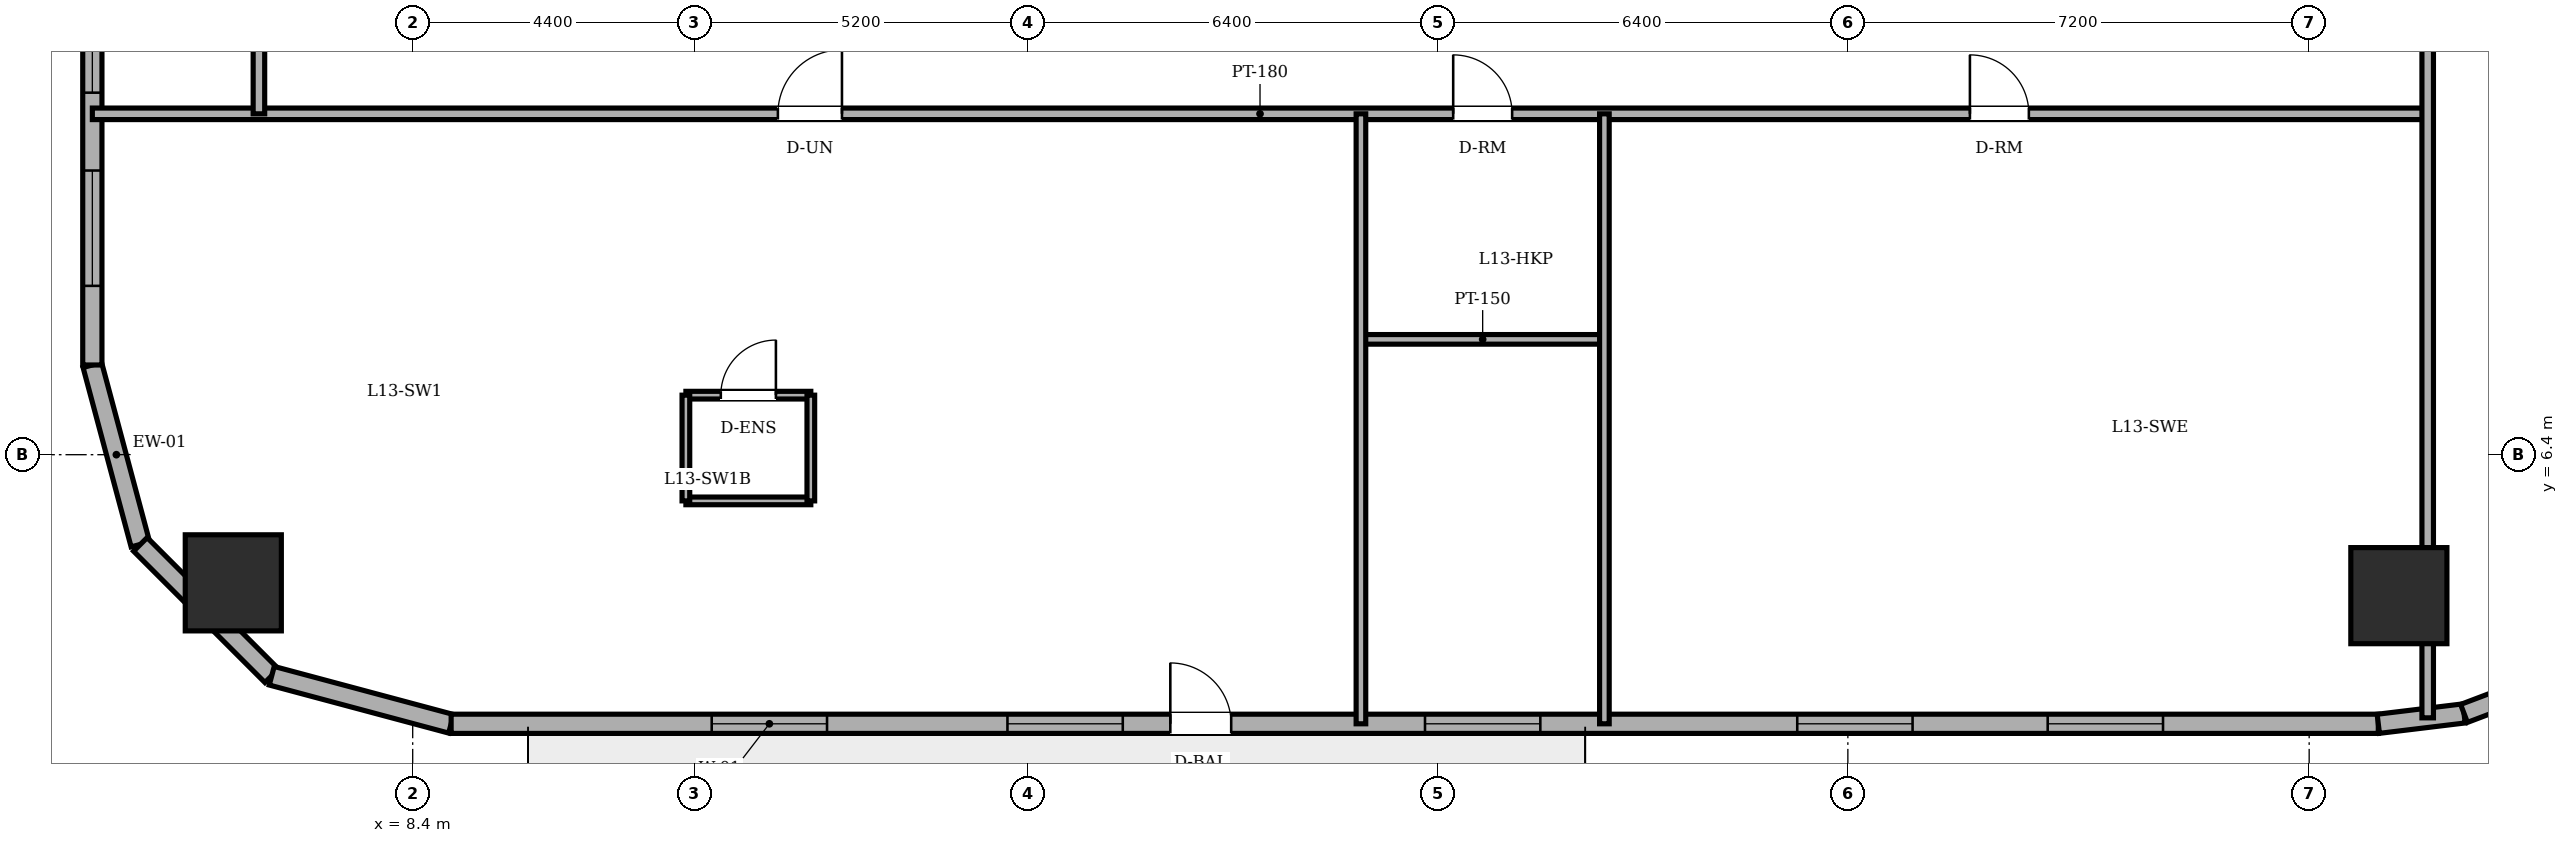
"""IFC4 building model, lengths in metres.
Left out: names, types, materials, properties, quantities, classifications, styles, units other than length and angle.
Written with IfcOpenShell. Run it as: python <this file> out.ifc"""

import sys

from ifc_helpers import new_model, si_unit, direction, frame, frame_2d, origin, origin_2d, place, context, subcontext, project, spatial, rectangle, circle, extrude, element, fill, save


model = new_model("IFC4")
c1 = context("Model", 3, precision=1e-05, world=origin(), true_north=direction((0.0, 1.0)))
c2 = subcontext(c1, "Body", "Model", "MODEL_VIEW")
j1 = project(units=[si_unit("LENGTHUNIT", "METRE"), si_unit("PLANEANGLEUNIT", "RADIAN")], contexts=[c1])
p1 = place(None, origin())
s1 = spatial("IfcSite", under=j1, at=p1, CompositionType="ELEMENT")
p2 = place(p1, origin())
s2 = spatial("IfcBuilding", under=s1, at=p2, CompositionType="ELEMENT")
p3 = place(p2, frame((0.0, 0.0, 50.4)))
s3 = spatial("IfcBuildingStorey", under=s2, at=p3, CompositionType="ELEMENT", Elevation=50.4)
for number, where, z_axis, x_axis in (
    (1, (5.6, 4.4, 0.0), (0.0, 0.0, 1.0), (1.0, 0.0, 0.0)),
    (2, (39.4, 4.2, 0.0), (0.0, 0.0, 1.0), (1.0, 0.0, 0.0)),
):
    element("IfcColumn", number, at=place(p3, frame(where, z_axis=z_axis, x_axis=x_axis)), inside=s3, PredefinedType="COLUMN", context=c2, shape_type="SweptSolid", body=[
        extrude(circle(Radius=0.75, at=origin_2d()), origin(), (0.0, 0.0, 1.0), 3.6),
    ])
p4 = place(p3, frame((3.4, 7.8, 0.0), z_axis=(0.0, 0.0, 1.0), x_axis=(0.258731875344, -0.96594917914, 0.0)))
e3 = element("IfcWall", 3, at=p4, inside=s3, PredefinedType="SOLIDWALL", context=c2, shape_type="SweptSolid", body=[
    extrude(rectangle(XDim=2.899, YDim=0.3, at=frame_2d((1.449, 0.0))), origin(), (0.0, 0.0, 1.0), 3.4),
])
p5 = place(p3, frame((4.15, 5.0, 0.0), z_axis=(0.0, 0.0, 1.0), x_axis=(0.707106781187, -0.707106781187, 0.0)))
e4 = element("IfcWall", 4, at=p5, inside=s3, PredefinedType="SOLIDWALL", context=c2, shape_type="SweptSolid", body=[
    extrude(rectangle(XDim=2.899, YDim=0.3, at=frame_2d((1.45, 0.0))), origin(), (0.0, 0.0, 1.0), 3.4),
])
p6 = place(p3, frame((6.2, 2.95, 0.0), z_axis=(0.0, 0.0, 1.0), x_axis=(0.96594917914, -0.258731875344, 0.0)))
e5 = element("IfcWall", 5, at=p6, inside=s3, PredefinedType="SOLIDWALL", context=c2, shape_type="SweptSolid", body=[
    extrude(rectangle(XDim=2.899, YDim=0.3, at=frame_2d((1.449, 0.0))), origin(), (0.0, 0.0, 1.0), 3.4),
])
p7 = place(p3, frame((9.0, 2.2, 0.0), z_axis=(0.0, 0.0, 1.0), x_axis=(1.0, 0.0, 0.0)))
e6 = element("IfcWall", 6, at=p7, inside=s3, PredefinedType="SOLIDWALL", context=c2, shape_type="SweptSolid", body=[
    extrude(rectangle(XDim=30.079, YDim=0.3, at=frame_2d((15.04, 0.0))), origin(), (0.0, 0.0, 1.0), 3.4),
])
p8 = place(p7, frame((11.225, 0.0, 0.0)))
e7 = element("IfcOpeningElement", 7, at=p8, cuts=e6, PredefinedType="OPENING", context=c2, shape_type="SweptSolid", body=[
    extrude(rectangle(XDim=0.95, YDim=2.2, at=frame_2d((0.475, 1.1))), frame((0.0, 0.16, 0.0), z_axis=(0.0, -1.0, 0.0), x_axis=(1.0, 0.0, 0.0)), (0.0, 0.0, 1.0), 0.32),
])
p9 = place(p7, frame((4.067, 0.0, 0.85)))
e8 = element("IfcOpeningElement", 8, at=p9, cuts=e6, PredefinedType="OPENING", context=c2, shape_type="SweptSolid", body=[
    extrude(rectangle(XDim=1.8, YDim=1.55, at=frame_2d((0.9, 0.775))), frame((0.0, 0.16, 0.0), z_axis=(0.0, -1.0, 0.0), x_axis=(1.0, 0.0, 0.0)), (0.0, 0.0, 1.0), 0.32),
])
p10 = place(p7, frame((8.683, 0.0, 0.85)))
e9 = element("IfcOpeningElement", 9, at=p10, cuts=e6, PredefinedType="OPENING", context=c2, shape_type="SweptSolid", body=[
    extrude(rectangle(XDim=1.8, YDim=1.55, at=frame_2d((0.9, 0.775))), frame((0.0, 0.16, 0.0), z_axis=(0.0, -1.0, 0.0), x_axis=(1.0, 0.0, 0.0)), (0.0, 0.0, 1.0), 0.32),
])
p11 = place(p7, frame((15.2, 0.0, 0.85)))
e10 = element("IfcOpeningElement", 10, at=p11, cuts=e6, PredefinedType="OPENING", context=c2, shape_type="SweptSolid", body=[
    extrude(rectangle(XDim=1.8, YDim=1.55, at=frame_2d((0.9, 0.775))), frame((0.0, 0.16, 0.0), z_axis=(0.0, -1.0, 0.0), x_axis=(1.0, 0.0, 0.0)), (0.0, 0.0, 1.0), 0.32),
])
p12 = place(p7, frame((21.01, 0.0, 0.85)))
e11 = element("IfcOpeningElement", 11, at=p12, cuts=e6, PredefinedType="OPENING", context=c2, shape_type="SweptSolid", body=[
    extrude(rectangle(XDim=1.8, YDim=1.55, at=frame_2d((0.9, 0.775))), frame((0.0, 0.16, 0.0), z_axis=(0.0, -1.0, 0.0), x_axis=(1.0, 0.0, 0.0)), (0.0, 0.0, 1.0), 0.32),
])
p13 = place(p7, frame((24.919, 0.0, 0.85)))
e12 = element("IfcOpeningElement", 12, at=p13, cuts=e6, PredefinedType="OPENING", context=c2, shape_type="SweptSolid", body=[
    extrude(rectangle(XDim=1.8, YDim=1.55, at=frame_2d((0.9, 0.775))), frame((0.0, 0.16, 0.0), z_axis=(0.0, -1.0, 0.0), x_axis=(1.0, 0.0, 0.0)), (0.0, 0.0, 1.0), 0.32),
])
p14 = place(p3, frame((39.079, 2.2, 0.0), z_axis=(0.0, 0.0, 1.0), x_axis=(0.992739027259, 0.120288086515, 0.0)))
e13 = element("IfcWall", 13, at=p14, inside=s3, PredefinedType="SOLIDWALL", context=c2, shape_type="SweptSolid", body=[
    extrude(rectangle(XDim=1.348, YDim=0.3, at=frame_2d((0.674, 0.0))), origin(), (0.0, 0.0, 1.0), 3.4),
])
p15 = place(p3, frame((40.417, 2.362, 0.0), z_axis=(0.0, 0.0, 1.0), x_axis=(0.935156721165, 0.354234254216, 0.0)))
e14 = element("IfcWall", 14, at=p15, inside=s3, PredefinedType="SOLIDWALL", context=c2, shape_type="SweptSolid", body=[
    extrude(rectangle(XDim=1.349, YDim=0.3, at=frame_2d((0.675, 0.0))), origin(), (0.0, 0.0, 1.0), 3.4),
])
p16 = place(p3, frame((3.4, 40.2, 0.0), z_axis=(0.0, 0.0, 1.0), x_axis=(0.0, -1.0, 0.0)))
e15 = element("IfcWall", 15, at=p16, inside=s3, PredefinedType="SOLIDWALL", context=c2, shape_type="SweptSolid", body=[
    extrude(rectangle(XDim=32.4, YDim=0.3, at=frame_2d((16.2, 0.0))), origin(), (0.0, 0.0, 1.0), 3.4),
])
p17 = place(p16, frame((1.235, 0.0, 0.85)))
e16 = element("IfcOpeningElement", 16, at=p17, cuts=e15, PredefinedType="OPENING", context=c2, shape_type="SweptSolid", body=[
    extrude(rectangle(XDim=1.8, YDim=1.55, at=frame_2d((0.9, 0.775))), frame((0.0, 0.16, 0.0), z_axis=(0.0, -1.0, 0.0), x_axis=(1.0, 0.0, 0.0)), (0.0, 0.0, 1.0), 0.32),
])
p18 = place(p16, frame((4.25, 0.0, 0.85)))
e17 = element("IfcOpeningElement", 17, at=p18, cuts=e15, PredefinedType="OPENING", context=c2, shape_type="SweptSolid", body=[
    extrude(rectangle(XDim=1.8, YDim=1.55, at=frame_2d((0.9, 0.775))), frame((0.0, 0.16, 0.0), z_axis=(0.0, -1.0, 0.0), x_axis=(1.0, 0.0, 0.0)), (0.0, 0.0, 1.0), 0.32),
])
p19 = place(p16, frame((9.253, 0.0, 0.85)))
e18 = element("IfcOpeningElement", 18, at=p19, cuts=e15, PredefinedType="OPENING", context=c2, shape_type="SweptSolid", body=[
    extrude(rectangle(XDim=1.8, YDim=1.55, at=frame_2d((0.9, 0.775))), frame((0.0, 0.16, 0.0), z_axis=(0.0, -1.0, 0.0), x_axis=(1.0, 0.0, 0.0)), (0.0, 0.0, 1.0), 0.32),
])
p20 = place(p16, frame((13.027, 0.0, 0.85)))
e19 = element("IfcOpeningElement", 19, at=p20, cuts=e15, PredefinedType="OPENING", context=c2, shape_type="SweptSolid", body=[
    extrude(rectangle(XDim=1.8, YDim=1.55, at=frame_2d((0.9, 0.775))), frame((0.0, 0.16, 0.0), z_axis=(0.0, -1.0, 0.0), x_axis=(1.0, 0.0, 0.0)), (0.0, 0.0, 1.0), 0.32),
])
p21 = place(p16, frame((19.573, 0.0, 0.85)))
e20 = element("IfcOpeningElement", 20, at=p21, cuts=e15, PredefinedType="OPENING", context=c2, shape_type="SweptSolid", body=[
    extrude(rectangle(XDim=1.8, YDim=1.55, at=frame_2d((0.9, 0.775))), frame((0.0, 0.16, 0.0), z_axis=(0.0, -1.0, 0.0), x_axis=(1.0, 0.0, 0.0)), (0.0, 0.0, 1.0), 0.32),
])
p22 = place(p16, frame((22.347, 0.0, 0.85)))
e21 = element("IfcOpeningElement", 21, at=p22, cuts=e15, PredefinedType="OPENING", context=c2, shape_type="SweptSolid", body=[
    extrude(rectangle(XDim=1.8, YDim=1.55, at=frame_2d((0.9, 0.775))), frame((0.0, 0.16, 0.0), z_axis=(0.0, -1.0, 0.0), x_axis=(1.0, 0.0, 0.0)), (0.0, 0.0, 1.0), 0.32),
])
p23 = place(p16, frame((26.35, 0.0, 0.85)))
e22 = element("IfcOpeningElement", 22, at=p23, cuts=e15, PredefinedType="OPENING", context=c2, shape_type="SweptSolid", body=[
    extrude(rectangle(XDim=1.8, YDim=1.55, at=frame_2d((0.9, 0.775))), frame((0.0, 0.16, 0.0), z_axis=(0.0, -1.0, 0.0), x_axis=(1.0, 0.0, 0.0)), (0.0, 0.0, 1.0), 0.32),
])
p24 = place(p16, frame((29.365, 0.0, 0.85)))
e23 = element("IfcOpeningElement", 23, at=p24, cuts=e15, PredefinedType="OPENING", context=c2, shape_type="SweptSolid", body=[
    extrude(rectangle(XDim=1.8, YDim=1.55, at=frame_2d((0.9, 0.775))), frame((0.0, 0.16, 0.0), z_axis=(0.0, -1.0, 0.0), x_axis=(1.0, 0.0, 0.0)), (0.0, 0.0, 1.0), 0.32),
])
p25 = place(p3, frame((12.664, 7.329, 0.0), z_axis=(0.0, 0.0, 1.0), x_axis=(1.0, 0.0, 0.0)))
e24 = element("IfcWall", 24, at=p25, inside=s3, PredefinedType="PARTITIONING", context=c2, shape_type="SweptSolid", body=[
    extrude(rectangle(XDim=1.95, YDim=0.12, at=frame_2d((0.975, 0.0))), origin(), (0.0, 0.0, 1.0), 3.4),
])
p26 = place(p25, frame((0.545, 0.0, 0.0)))
e25 = element("IfcOpeningElement", 25, at=p26, cuts=e24, PredefinedType="OPENING", context=c2, shape_type="SweptSolid", body=[
    extrude(rectangle(XDim=0.86, YDim=2.1, at=frame_2d((0.43, 1.05))), frame((0.0, 0.07, 0.0), z_axis=(0.0, -1.0, 0.0), x_axis=(1.0, 0.0, 0.0)), (0.0, 0.0, 1.0), 0.14),
])
p27 = place(p3, frame((14.614, 5.679, 0.0), z_axis=(0.0, 0.0, 1.0), x_axis=(-1.0, 0.0, 0.0)))
e26 = element("IfcWall", 26, at=p27, inside=s3, PredefinedType="PARTITIONING", context=c2, shape_type="SweptSolid", body=[
    extrude(rectangle(XDim=1.95, YDim=0.12, at=frame_2d((0.975, 0.0))), origin(), (0.0, 0.0, 1.0), 3.4),
])
for number, where, z_axis, x_axis in (
    (27, (12.664, 7.329, 0.0), (0.0, 0.0, 1.0), (0.0, -1.0, 0.0)),
    (28, (14.614, 5.679, 0.0), (0.0, 0.0, 1.0), (0.0, 1.0, 0.0)),
):
    element("IfcWall", number, at=place(p3, frame(where, z_axis=z_axis, x_axis=x_axis)), inside=s3, PredefinedType="PARTITIONING", context=c2, shape_type="SweptSolid", body=[
        extrude(rectangle(XDim=1.65, YDim=0.12, at=frame_2d((0.825, 0.0))), origin(), (0.0, 0.0, 1.0), 3.4),
    ])
p28 = place(p3, frame((23.2, 8.2, 0.0), z_axis=(0.0, 0.0, 1.0), x_axis=(1.0, 0.0, 0.0)))
e29 = element("IfcWall", 29, at=p28, inside=s3, PredefinedType="PARTITIONING", context=c2, shape_type="SweptSolid", body=[
    extrude(rectangle(XDim=3.8, YDim=0.15, at=frame_2d((1.9, 0.0))), origin(), (0.0, 0.0, 1.0), 3.4),
])
p29 = place(p3, frame((3.4, 11.72, 0.0), z_axis=(0.0, 0.0, 1.0), x_axis=(1.0, 0.0, 0.0)))
e30 = element("IfcWall", 30, at=p29, inside=s3, PredefinedType="PARTITIONING", context=c2, shape_type="SweptSolid", body=[
    extrude(rectangle(XDim=36.45, YDim=0.18, at=frame_2d((18.225, 0.0))), origin(), (0.0, 0.0, 1.0), 3.4),
])
p30 = place(p29, frame((21.24, 0.0, 0.0)))
e31 = element("IfcOpeningElement", 31, at=p30, cuts=e30, PredefinedType="OPENING", context=c2, shape_type="SweptSolid", body=[
    extrude(rectangle(XDim=0.92, YDim=2.1, at=frame_2d((0.46, 1.05))), frame((0.0, 0.1, 0.0), z_axis=(0.0, -1.0, 0.0), x_axis=(1.0, 0.0, 0.0)), (0.0, 0.0, 1.0), 0.2),
])
p31 = place(p29, frame((10.7, 0.0, 0.0)))
e32 = element("IfcOpeningElement", 32, at=p31, cuts=e30, PredefinedType="OPENING", context=c2, shape_type="SweptSolid", body=[
    extrude(rectangle(XDim=1.0, YDim=2.15, at=frame_2d((0.5, 1.075))), frame((0.0, 0.1, 0.0), z_axis=(0.0, -1.0, 0.0), x_axis=(1.0, 0.0, 0.0)), (0.0, 0.0, 1.0), 0.2),
])
p32 = place(p29, frame((29.305, 0.0, 0.0)))
e33 = element("IfcOpeningElement", 33, at=p32, cuts=e30, PredefinedType="OPENING", context=c2, shape_type="SweptSolid", body=[
    extrude(rectangle(XDim=0.92, YDim=2.1, at=frame_2d((0.46, 1.05))), frame((0.0, 0.1, 0.0), z_axis=(0.0, -1.0, 0.0), x_axis=(1.0, 0.0, 0.0)), (0.0, 0.0, 1.0), 0.2),
])
p33 = place(p3, frame((6.0, 11.72, 0.0), z_axis=(0.0, 0.0, 1.0), x_axis=(0.0, 1.0, 0.0)))
e34 = element("IfcWall", 34, at=p33, inside=s3, PredefinedType="PARTITIONING", context=c2, shape_type="SweptSolid", body=[
    extrude(rectangle(XDim=2.46, YDim=0.18, at=frame_2d((1.23, 0.0))), origin(), (0.0, 0.0, 1.0), 3.4),
])
for number, where, z_axis, x_axis in (
    (35, (23.2, 2.2, 0.0), (0.0, 0.0, 1.0), (0.0, 1.0, 0.0)),
    (36, (27.0, 2.2, 0.0), (0.0, 0.0, 1.0), (0.0, 1.0, 0.0)),
):
    element("IfcWall", number, at=place(p3, frame(where, z_axis=z_axis, x_axis=x_axis)), inside=s3, PredefinedType="PARTITIONING", context=c2, shape_type="SweptSolid", body=[
        extrude(rectangle(XDim=9.52, YDim=0.15, at=frame_2d((4.76, 0.0))), origin(), (0.0, 0.0, 1.0), 3.4),
    ])
p34 = place(p3, frame((39.85, 2.293, 0.0), z_axis=(0.0, 0.0, 1.0), x_axis=(0.0, 1.0, 0.0)))
e37 = element("IfcWall", 37, at=p34, inside=s3, PredefinedType="PARTITIONING", context=c2, shape_type="SweptSolid", body=[
    extrude(rectangle(XDim=20.527, YDim=0.18, at=frame_2d((10.264, 0.0))), origin(), (0.0, 0.0, 1.0), 2.782),
])
p35 = place(p34, frame((14.257, 0.0, 0.0)))
e38 = element("IfcOpeningElement", 38, at=p35, cuts=e37, PredefinedType="OPENING", context=c2, shape_type="SweptSolid", body=[
    extrude(rectangle(XDim=0.92, YDim=2.1, at=frame_2d((0.46, 1.05))), frame((0.0, 0.1, 0.0), z_axis=(0.0, -1.0, 0.0), x_axis=(1.0, 0.0, 0.0)), (0.0, 0.0, 1.0), 0.2),
])
p36 = place(p8, origin())
e39 = element("IfcDoor", 39, at=p36, inside=s3, OperationType="SINGLE_SWING_LEFT", PredefinedType="DOOR", context=c2, shape_type="SweptSolid", body=[
    extrude(rectangle(XDim=0.95, YDim=2.2, at=frame_2d((0.475, 1.1))), frame((0.0, 0.025, 0.0), z_axis=(0.0, -1.0, 0.0), x_axis=(1.0, 0.0, 0.0)), (0.0, 0.0, 1.0), 0.05),
])
fill(e7, e39)
p37 = place(p9, origin())
e40 = element("IfcWindow", 40, at=p37, inside=s3, PartitioningType="DOUBLE_PANEL_VERTICAL", PredefinedType="WINDOW", context=c2, shape_type="SweptSolid", body=[
    extrude(rectangle(XDim=1.8, YDim=1.55, at=frame_2d((0.9, 0.775))), frame((0.0, 0.03, 0.0), z_axis=(0.0, -1.0, 0.0), x_axis=(1.0, 0.0, 0.0)), (0.0, 0.0, 1.0), 0.06),
])
fill(e8, e40)
p38 = place(p10, origin())
e41 = element("IfcWindow", 41, at=p38, inside=s3, PartitioningType="DOUBLE_PANEL_VERTICAL", PredefinedType="WINDOW", context=c2, shape_type="SweptSolid", body=[
    extrude(rectangle(XDim=1.8, YDim=1.55, at=frame_2d((0.9, 0.775))), frame((0.0, 0.03, 0.0), z_axis=(0.0, -1.0, 0.0), x_axis=(1.0, 0.0, 0.0)), (0.0, 0.0, 1.0), 0.06),
])
fill(e9, e41)
p39 = place(p11, origin())
e42 = element("IfcWindow", 42, at=p39, inside=s3, PartitioningType="DOUBLE_PANEL_VERTICAL", PredefinedType="WINDOW", context=c2, shape_type="SweptSolid", body=[
    extrude(rectangle(XDim=1.8, YDim=1.55, at=frame_2d((0.9, 0.775))), frame((0.0, 0.03, 0.0), z_axis=(0.0, -1.0, 0.0), x_axis=(1.0, 0.0, 0.0)), (0.0, 0.0, 1.0), 0.06),
])
fill(e10, e42)
p40 = place(p12, origin())
e43 = element("IfcWindow", 43, at=p40, inside=s3, PartitioningType="DOUBLE_PANEL_VERTICAL", PredefinedType="WINDOW", context=c2, shape_type="SweptSolid", body=[
    extrude(rectangle(XDim=1.8, YDim=1.55, at=frame_2d((0.9, 0.775))), frame((0.0, 0.03, 0.0), z_axis=(0.0, -1.0, 0.0), x_axis=(1.0, 0.0, 0.0)), (0.0, 0.0, 1.0), 0.06),
])
fill(e11, e43)
p41 = place(p13, origin())
e44 = element("IfcWindow", 44, at=p41, inside=s3, PartitioningType="DOUBLE_PANEL_VERTICAL", PredefinedType="WINDOW", context=c2, shape_type="SweptSolid", body=[
    extrude(rectangle(XDim=1.8, YDim=1.55, at=frame_2d((0.9, 0.775))), frame((0.0, 0.03, 0.0), z_axis=(0.0, -1.0, 0.0), x_axis=(1.0, 0.0, 0.0)), (0.0, 0.0, 1.0), 0.06),
])
fill(e12, e44)
p42 = place(p23, origin())
e45 = element("IfcWindow", 45, at=p42, inside=s3, PartitioningType="DOUBLE_PANEL_VERTICAL", PredefinedType="WINDOW", context=c2, shape_type="SweptSolid", body=[
    extrude(rectangle(XDim=1.8, YDim=1.55, at=frame_2d((0.9, 0.775))), frame((0.0, 0.03, 0.0), z_axis=(0.0, -1.0, 0.0), x_axis=(1.0, 0.0, 0.0)), (0.0, 0.0, 1.0), 0.06),
])
fill(e22, e45)
p43 = place(p24, origin())
e46 = element("IfcWindow", 46, at=p43, inside=s3, PartitioningType="DOUBLE_PANEL_VERTICAL", PredefinedType="WINDOW", context=c2, shape_type="SweptSolid", body=[
    extrude(rectangle(XDim=1.8, YDim=1.55, at=frame_2d((0.9, 0.775))), frame((0.0, 0.03, 0.0), z_axis=(0.0, -1.0, 0.0), x_axis=(1.0, 0.0, 0.0)), (0.0, 0.0, 1.0), 0.06),
])
fill(e23, e46)
p44 = place(p26, origin())
e47 = element("IfcDoor", 47, at=p44, inside=s3, OperationType="SINGLE_SWING_RIGHT", PredefinedType="DOOR", context=c2, shape_type="SweptSolid", body=[
    extrude(rectangle(XDim=0.86, YDim=2.1, at=frame_2d((0.43, 1.05))), frame((0.0, 0.025, 0.0), z_axis=(0.0, -1.0, 0.0), x_axis=(1.0, 0.0, 0.0)), (0.0, 0.0, 1.0), 0.05),
])
fill(e25, e47)
p45 = place(p30, origin())
e48 = element("IfcDoor", 48, at=p45, inside=s3, OperationType="SINGLE_SWING_LEFT", PredefinedType="DOOR", context=c2, shape_type="SweptSolid", body=[
    extrude(rectangle(XDim=0.92, YDim=2.1, at=frame_2d((0.46, 1.05))), frame((0.0, 0.025, 0.0), z_axis=(0.0, -1.0, 0.0), x_axis=(1.0, 0.0, 0.0)), (0.0, 0.0, 1.0), 0.05),
])
fill(e31, e48)
p46 = place(p31, origin())
e49 = element("IfcDoor", 49, at=p46, inside=s3, OperationType="SINGLE_SWING_RIGHT", PredefinedType="DOOR", context=c2, shape_type="SweptSolid", body=[
    extrude(rectangle(XDim=1.0, YDim=2.15, at=frame_2d((0.5, 1.075))), frame((0.0, 0.025, 0.0), z_axis=(0.0, -1.0, 0.0), x_axis=(1.0, 0.0, 0.0)), (0.0, 0.0, 1.0), 0.05),
])
fill(e32, e49)
p47 = place(p32, origin())
e50 = element("IfcDoor", 50, at=p47, inside=s3, OperationType="SINGLE_SWING_LEFT", PredefinedType="DOOR", context=c2, shape_type="SweptSolid", body=[
    extrude(rectangle(XDim=0.92, YDim=2.1, at=frame_2d((0.46, 1.05))), frame((0.0, 0.025, 0.0), z_axis=(0.0, -1.0, 0.0), x_axis=(1.0, 0.0, 0.0)), (0.0, 0.0, 1.0), 0.05),
])
fill(e33, e50)
save(model, sys.argv[1])
